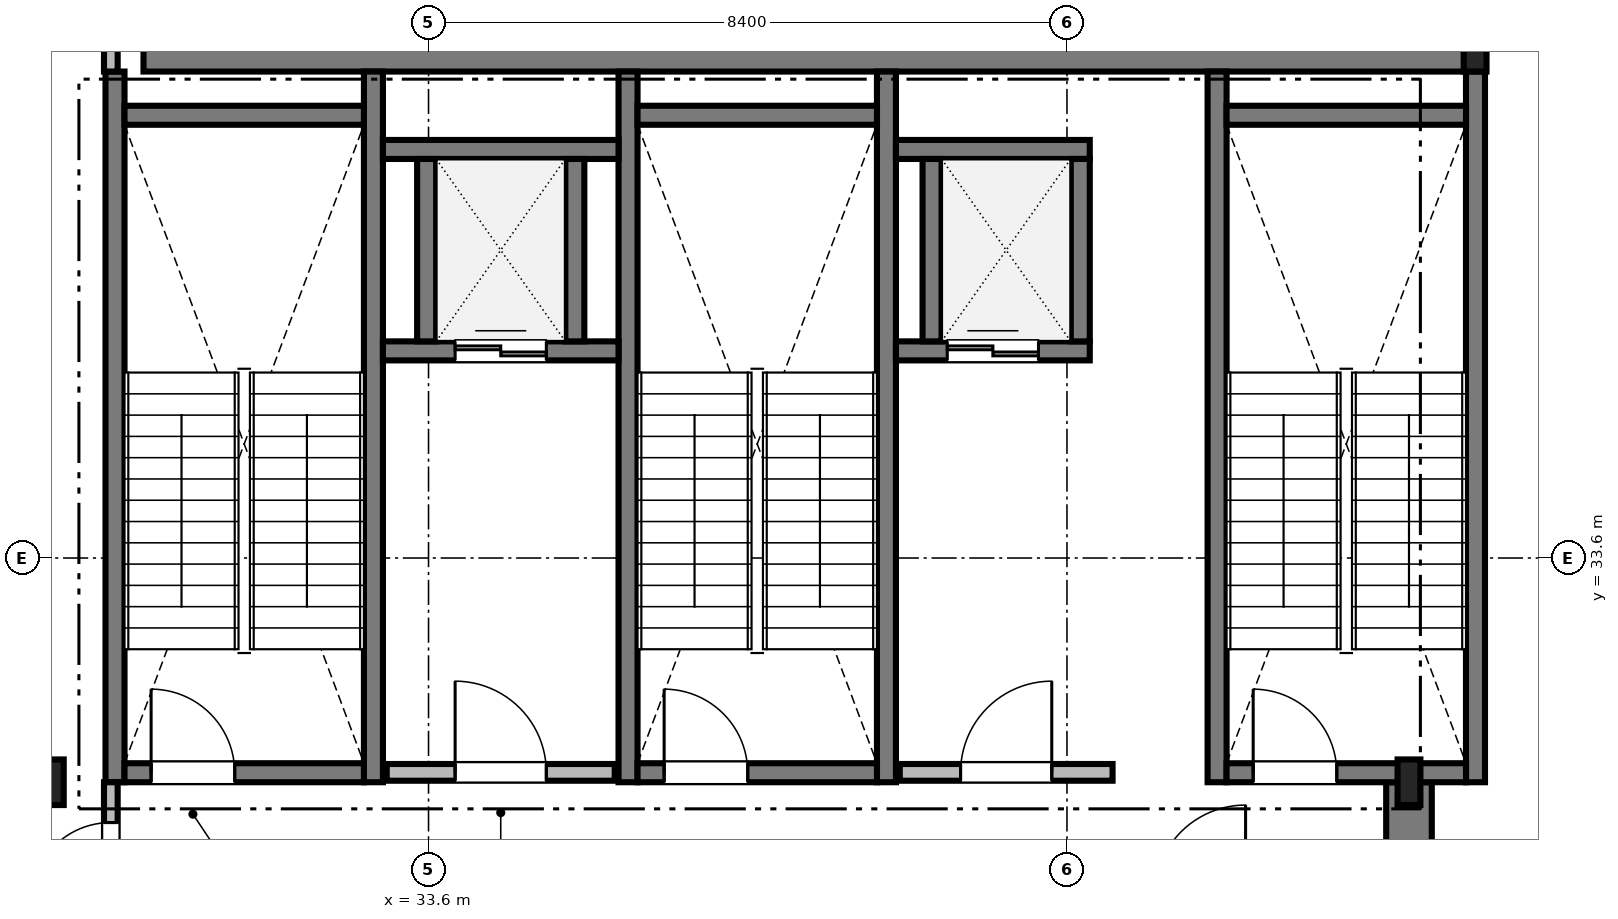
"""IFC4 building model, lengths in metres.
Left out: names, types, materials, properties, quantities, classifications, styles, units other than length and angle.
Written with IfcOpenShell. Run it as: python <this file> out.ifc"""

import sys

from ifc_helpers import new_model, si_unit, direction, frame, frame_2d, origin, origin_2d, place, context, subcontext, project, spatial, rectangle, i_section, extrude, source, transform, mapped, element, fill, save


model = new_model("IFC4")
c1 = context("Model", 3, precision=1e-05, world=origin(), true_north=direction((0.0, 1.0)))
c2 = subcontext(c1, "Body", "Model", "MODEL_VIEW")
j1 = project(units=[si_unit("LENGTHUNIT", "METRE"), si_unit("PLANEANGLEUNIT", "RADIAN")], contexts=[c1])
p1 = place(None, origin())
s1 = spatial("IfcSite", under=j1, at=p1, CompositionType="ELEMENT")
p2 = place(p1, origin())
s2 = spatial("IfcBuilding", under=s1, at=p2, CompositionType="ELEMENT")
p3 = place(p2, frame((0.0, 0.0, 291.15)))
s3 = spatial("IfcBuildingStorey", under=s2, at=p3, CompositionType="ELEMENT", Elevation=291.15)
m1 = source(origin(), c2, "Body", "SweptSolid", [
    extrude(rectangle(XDim=17.52, YDim=0.6, at=frame_2d((8.76, 0.0))), origin(), (0.0, 0.0, 1.0), 4.7),
])
p4 = place(p3, frame((29.85, 40.3, 0.0), z_axis=(0.0, 0.0, 1.0), x_axis=(1.0, 0.0, 0.0)))
e1 = element("IfcWall", 1, at=p4, inside=s3, PredefinedType="SHEAR", context=c2, shape_type="MappedRepresentation", body=[
    mapped(m1, transform((0.0, 0.0, 0.0), scale=1.0)),
])
m2 = source(origin(), c2, "Body", "SweptSolid", [
    extrude(rectangle(XDim=13.15, YDim=0.6, at=frame_2d((6.575, 0.0))), origin(), (0.0, 0.0, 1.0), 4.7),
])
p5 = place(p3, frame((46.5, 17.5, 0.0), z_axis=(0.0, 0.0, 1.0), x_axis=(0.0, 1.0, 0.0)))
e2 = element("IfcWall", 2, at=p5, inside=s3, PredefinedType="SHEAR", context=c2, shape_type="MappedRepresentation", body=[
    mapped(m2, transform((0.0, 0.0, 0.0), scale=1.0)),
])
m3 = source(origin(), c2, "Body", "SweptSolid", [
    extrude(i_section(OverallWidth=0.3, OverallDepth=0.6, WebThickness=0.015, FlangeThickness=0.03, FilletRadius=0.027, at=origin_2d()), origin(), (0.0, 0.0, 1.0), 4.7),
])
for number, where, z_axis, x_axis in (
    (3, (28.65, 30.65, 0.0), (0.0, 0.0, 1.0), (1.0, 0.0, 0.0)),
    (4, (46.5, 30.65, 0.0), (0.0, 0.0, 1.0), (1.0, 0.0, 0.0)),
    (5, (47.37, 40.3, 0.0), (0.0, 0.0, 1.0), (1.0, 0.0, 0.0)),
):
    element("IfcColumn", number, at=place(p3, frame(where, z_axis=z_axis, x_axis=x_axis)), inside=s3, PredefinedType="COLUMN", context=c2, shape_type="MappedRepresentation", body=[
        mapped(m3, transform((0.0, 0.0, 0.0), scale=1.0)),
    ])
m4 = source(origin(), c2, "Body", "SweptSolid", [
    extrude(rectangle(XDim=9.35, YDim=0.25, at=frame_2d((4.675, 0.0))), origin(), (0.0, 0.0, 1.0), 4.8),
])
for number, where, z_axis, x_axis in (
    (6, (29.475, 30.65, 0.0), (0.0, 0.0, 1.0), (0.0, 1.0, 0.0)),
    (7, (32.875, 30.65, 0.0), (0.0, 0.0, 1.0), (0.0, 1.0, 0.0)),
):
    element("IfcWall", number, at=place(p3, frame(where, z_axis=z_axis, x_axis=x_axis)), inside=s3, PredefinedType="SOLIDWALL", context=c2, shape_type="MappedRepresentation", body=[
        mapped(m4, transform((0.0, 0.0, 0.0), scale=1.0)),
    ])
m5 = source(origin(), c2, "Body", "SweptSolid", [
    extrude(rectangle(XDim=3.15, YDim=0.25, at=frame_2d((1.575, 0.0))), origin(), (0.0, 0.0, 1.0), 4.8),
])
p6 = place(p3, frame((29.6, 39.425, 0.0), z_axis=(0.0, 0.0, 1.0), x_axis=(1.0, 0.0, 0.0)))
e8 = element("IfcWall", 8, at=p6, inside=s3, PredefinedType="SOLIDWALL", context=c2, shape_type="MappedRepresentation", body=[
    mapped(m5, transform((0.0, 0.0, 0.0), scale=1.0)),
])
p7 = place(p3, frame((29.6, 30.775, 0.0), z_axis=(0.0, 0.0, 1.0), x_axis=(1.0, 0.0, 0.0)))
e9 = element("IfcWall", 9, at=p7, inside=s3, PredefinedType="SOLIDWALL", context=c2, shape_type="MappedRepresentation", body=[
    mapped(m5, transform((0.0, 0.0, 0.0), scale=1.0)),
])
m6 = source(origin(), c2, "Body", "SweptSolid", [
    extrude(rectangle(XDim=1.1, YDim=2.2, at=frame_2d((0.55, 1.1))), frame((0.0, 0.135, 0.0), z_axis=(0.0, -1.0, 0.0), x_axis=(1.0, 0.0, 0.0)), (0.0, 0.0, 1.0), 0.27),
])
p8 = place(p7, frame((0.35, 0.0, 0.0)))
e10 = element("IfcOpeningElement", 10, at=p8, cuts=e9, PredefinedType="OPENING", context=c2, shape_type="MappedRepresentation", body=[
    mapped(m6, transform((0.0, 0.0, 0.0), scale=1.0)),
])
for number, where, z_axis, x_axis in (
    (11, (36.225, 30.65, 0.0), (0.0, 0.0, 1.0), (0.0, 1.0, 0.0)),
    (12, (39.625, 30.65, 0.0), (0.0, 0.0, 1.0), (0.0, 1.0, 0.0)),
):
    element("IfcWall", number, at=place(p3, frame(where, z_axis=z_axis, x_axis=x_axis)), inside=s3, PredefinedType="SOLIDWALL", context=c2, shape_type="MappedRepresentation", body=[
        mapped(m4, transform((0.0, 0.0, 0.0), scale=1.0)),
    ])
p9 = place(p3, frame((36.35, 39.425, 0.0), z_axis=(0.0, 0.0, 1.0), x_axis=(1.0, 0.0, 0.0)))
e13 = element("IfcWall", 13, at=p9, inside=s3, PredefinedType="SOLIDWALL", context=c2, shape_type="MappedRepresentation", body=[
    mapped(m5, transform((0.0, 0.0, 0.0), scale=1.0)),
])
p10 = place(p3, frame((36.35, 30.775, 0.0), z_axis=(0.0, 0.0, 1.0), x_axis=(1.0, 0.0, 0.0)))
e14 = element("IfcWall", 14, at=p10, inside=s3, PredefinedType="SOLIDWALL", context=c2, shape_type="MappedRepresentation", body=[
    mapped(m5, transform((0.0, 0.0, 0.0), scale=1.0)),
])
p11 = place(p10, frame((0.35, 0.0, 0.0)))
e15 = element("IfcOpeningElement", 15, at=p11, cuts=e14, PredefinedType="OPENING", context=c2, shape_type="MappedRepresentation", body=[
    mapped(m6, transform((0.0, 0.0, 0.0), scale=1.0)),
])
for number, where, z_axis, x_axis in (
    (16, (43.975, 30.65, 0.0), (0.0, 0.0, 1.0), (0.0, 1.0, 0.0)),
    (17, (47.375, 30.65, 0.0), (0.0, 0.0, 1.0), (0.0, 1.0, 0.0)),
):
    element("IfcWall", number, at=place(p3, frame(where, z_axis=z_axis, x_axis=x_axis)), inside=s3, PredefinedType="SOLIDWALL", context=c2, shape_type="MappedRepresentation", body=[
        mapped(m4, transform((0.0, 0.0, 0.0), scale=1.0)),
    ])
p12 = place(p3, frame((44.1, 39.425, 0.0), z_axis=(0.0, 0.0, 1.0), x_axis=(1.0, 0.0, 0.0)))
e18 = element("IfcWall", 18, at=p12, inside=s3, PredefinedType="SOLIDWALL", context=c2, shape_type="MappedRepresentation", body=[
    mapped(m5, transform((0.0, 0.0, 0.0), scale=1.0)),
])
p13 = place(p3, frame((44.1, 30.775, 0.0), z_axis=(0.0, 0.0, 1.0), x_axis=(1.0, 0.0, 0.0)))
e19 = element("IfcWall", 19, at=p13, inside=s3, PredefinedType="SOLIDWALL", context=c2, shape_type="MappedRepresentation", body=[
    mapped(m5, transform((0.0, 0.0, 0.0), scale=1.0)),
])
p14 = place(p13, frame((0.35, 0.0, 0.0)))
e20 = element("IfcOpeningElement", 20, at=p14, cuts=e19, PredefinedType="OPENING", context=c2, shape_type="MappedRepresentation", body=[
    mapped(m6, transform((0.0, 0.0, 0.0), scale=1.0)),
])
m7 = source(origin(), c2, "Body", "SweptSolid", [
    extrude(rectangle(XDim=3.0, YDim=0.22, at=frame_2d((1.5, 0.0))), origin(), (0.0, 0.0, 1.0), 4.7),
])
p15 = place(p3, frame((33.05, 30.78, 0.0), z_axis=(0.0, 0.0, 1.0), x_axis=(1.0, 0.0, 0.0)))
e21 = element("IfcWall", 21, at=p15, inside=s3, PredefinedType="SOLIDWALL", context=c2, shape_type="MappedRepresentation", body=[
    mapped(m7, transform((0.0, 0.0, 0.0), scale=1.0)),
])
m8 = source(origin(), c2, "Body", "SweptSolid", [
    extrude(rectangle(XDim=1.2, YDim=2.2, at=frame_2d((0.6, 1.1))), frame((0.0, 0.12, 0.0), z_axis=(0.0, -1.0, 0.0), x_axis=(1.0, 0.0, 0.0)), (0.0, 0.0, 1.0), 0.24),
])
p16 = place(p15, frame((0.9, 0.0, 0.0)))
e22 = element("IfcOpeningElement", 22, at=p16, cuts=e21, PredefinedType="OPENING", context=c2, shape_type="MappedRepresentation", body=[
    mapped(m8, transform((0.0, 0.0, 0.0), scale=1.0)),
])
m9 = source(origin(), c2, "Body", "SweptSolid", [
    extrude(rectangle(XDim=2.8, YDim=0.22, at=frame_2d((1.4, 0.0))), origin(), (0.0, 0.0, 1.0), 4.7),
])
p17 = place(p3, frame((39.8, 30.78, 0.0), z_axis=(0.0, 0.0, 1.0), x_axis=(1.0, 0.0, 0.0)))
e23 = element("IfcWall", 23, at=p17, inside=s3, PredefinedType="SOLIDWALL", context=c2, shape_type="MappedRepresentation", body=[
    mapped(m9, transform((0.0, 0.0, 0.0), scale=1.0)),
])
p18 = place(p17, frame((0.8, 0.0, 0.0)))
e24 = element("IfcOpeningElement", 24, at=p18, cuts=e23, PredefinedType="OPENING", context=c2, shape_type="MappedRepresentation", body=[
    mapped(m8, transform((0.0, 0.0, 0.0), scale=1.0)),
])
m10 = source(origin(), c2, "Body", "SweptSolid", [
    extrude(rectangle(XDim=3.1, YDim=0.25, at=frame_2d((1.55, 0.0))), origin(), (0.0, 0.0, 1.0), 4.7),
])
p19 = place(p3, frame((33.0, 36.325, 0.0), z_axis=(0.0, 0.0, 1.0), x_axis=(1.0, 0.0, 0.0)))
e25 = element("IfcWall", 25, at=p19, inside=s3, PredefinedType="SOLIDWALL", context=c2, shape_type="MappedRepresentation", body=[
    mapped(m10, transform((0.0, 0.0, 0.0), scale=1.0)),
])
m11 = source(origin(), c2, "Body", "SweptSolid", [
    extrude(rectangle(XDim=1.2, YDim=2.25, at=frame_2d((0.6, 1.125))), frame((0.0, 0.135, 0.0), z_axis=(0.0, -1.0, 0.0), x_axis=(1.0, 0.0, 0.0)), (0.0, 0.0, 1.0), 0.27),
])
p20 = place(p19, frame((0.95, 0.0, 0.0)))
e26 = element("IfcOpeningElement", 26, at=p20, cuts=e25, PredefinedType="OPENING", context=c2, shape_type="MappedRepresentation", body=[
    mapped(m11, transform((0.0, 0.0, 0.0), scale=1.0)),
])
p21 = place(p3, frame((33.0, 38.975, 0.0), z_axis=(0.0, 0.0, 1.0), x_axis=(1.0, 0.0, 0.0)))
e27 = element("IfcWall", 27, at=p21, inside=s3, PredefinedType="SOLIDWALL", context=c2, shape_type="MappedRepresentation", body=[
    mapped(m10, transform((0.0, 0.0, 0.0), scale=1.0)),
])
m12 = source(origin(), c2, "Body", "SweptSolid", [
    extrude(rectangle(XDim=2.4, YDim=0.25, at=frame_2d((1.2, 0.0))), origin(), (0.0, 0.0, 1.0), 4.7),
])
for number, where, z_axis, x_axis in (
    (28, (33.575, 36.45, 0.0), (0.0, 0.0, 1.0), (0.0, 1.0, 0.0)),
    (29, (35.525, 36.45, 0.0), (0.0, 0.0, 1.0), (0.0, 1.0, 0.0)),
):
    element("IfcWall", number, at=place(p3, frame(where, z_axis=z_axis, x_axis=x_axis)), inside=s3, PredefinedType="SOLIDWALL", context=c2, shape_type="MappedRepresentation", body=[
        mapped(m12, transform((0.0, 0.0, 0.0), scale=1.0)),
    ])
m13 = source(origin(), c2, "Body", "SweptSolid", [
    extrude(rectangle(XDim=2.55, YDim=0.25, at=frame_2d((1.275, 0.0))), origin(), (0.0, 0.0, 1.0), 4.7),
])
p22 = place(p3, frame((39.75, 36.325, 0.0), z_axis=(0.0, 0.0, 1.0), x_axis=(1.0, 0.0, 0.0)))
e30 = element("IfcWall", 30, at=p22, inside=s3, PredefinedType="SOLIDWALL", context=c2, shape_type="MappedRepresentation", body=[
    mapped(m13, transform((0.0, 0.0, 0.0), scale=1.0)),
])
p23 = place(p22, frame((0.675, 0.0, 0.0)))
e31 = element("IfcOpeningElement", 31, at=p23, cuts=e30, PredefinedType="OPENING", context=c2, shape_type="MappedRepresentation", body=[
    mapped(m11, transform((0.0, 0.0, 0.0), scale=1.0)),
])
p24 = place(p3, frame((39.75, 38.975, 0.0), z_axis=(0.0, 0.0, 1.0), x_axis=(1.0, 0.0, 0.0)))
e32 = element("IfcWall", 32, at=p24, inside=s3, PredefinedType="SOLIDWALL", context=c2, shape_type="MappedRepresentation", body=[
    mapped(m13, transform((0.0, 0.0, 0.0), scale=1.0)),
])
for number, where, z_axis, x_axis in (
    (33, (40.225, 36.45, 0.0), (0.0, 0.0, 1.0), (0.0, 1.0, 0.0)),
    (34, (42.175, 36.45, 0.0), (0.0, 0.0, 1.0), (0.0, 1.0, 0.0)),
):
    element("IfcWall", number, at=place(p3, frame(where, z_axis=z_axis, x_axis=x_axis)), inside=s3, PredefinedType="SOLIDWALL", context=c2, shape_type="MappedRepresentation", body=[
        mapped(m12, transform((0.0, 0.0, 0.0), scale=1.0)),
    ])
m14 = source(origin(), c2, "Body", "SweptSolid", [
    extrude(rectangle(XDim=2.13, YDim=0.18, at=frame_2d((1.065, 0.0))), origin(), (0.0, 0.0, 1.0), 4.332),
])
p25 = place(p3, frame((29.42, 28.52, 0.0), z_axis=(0.0, 0.0, 1.0), x_axis=(0.0, 1.0, 0.0)))
e35 = element("IfcWall", 35, at=p25, inside=s3, PredefinedType="PARTITIONING", context=c2, shape_type="MappedRepresentation", body=[
    mapped(m14, transform((0.0, 0.0, 0.0), scale=1.0)),
])
m15 = source(origin(), c2, "Body", "SweptSolid", [
    extrude(rectangle(XDim=1.05, YDim=2.2, at=frame_2d((0.525, 1.1))), frame((0.0, 0.1, 0.0), z_axis=(0.0, -1.0, 0.0), x_axis=(1.0, 0.0, 0.0)), (0.0, 0.0, 1.0), 0.2),
])
p26 = place(p25, frame((0.55, 0.0, 0.0)))
e36 = element("IfcOpeningElement", 36, at=p26, cuts=e35, PredefinedType="OPENING", context=c2, shape_type="MappedRepresentation", body=[
    mapped(m15, transform((0.0, 0.0, 0.0), scale=1.0)),
])
m16 = source(origin(), c2, "Body", "SweptSolid", [
    extrude(rectangle(XDim=3.418, YDim=0.18, at=frame_2d((1.709, 0.0))), origin(), (0.0, 0.0, 1.0), 3.942),
])
p27 = place(p3, frame((29.42, 40.0, 0.0), z_axis=(0.0, 0.0, 1.0), x_axis=(0.0, 1.0, 0.0)))
e37 = element("IfcWall", 37, at=p27, inside=s3, PredefinedType="PARTITIONING", context=c2, shape_type="MappedRepresentation", body=[
    mapped(m16, transform((0.0, 0.0, 0.0), scale=1.0)),
])
m17 = source(origin(), c2, "Body", "SweptSolid", [
    extrude(rectangle(XDim=1.1, YDim=2.2, at=frame_2d((0.55, 1.1))), frame((0.0, 0.025, 0.0), z_axis=(0.0, -1.0, 0.0), x_axis=(1.0, 0.0, 0.0)), (0.0, 0.0, 1.0), 0.05),
])
p28 = place(p8, origin())
e38 = element("IfcDoor", 38, at=p28, inside=s3, OperationType="SINGLE_SWING_LEFT", PredefinedType="DOOR", context=c2, shape_type="MappedRepresentation", body=[
    mapped(m17, transform((0.0, 0.0, 0.0), scale=1.0)),
])
fill(e10, e38)
p29 = place(p11, origin())
e39 = element("IfcDoor", 39, at=p29, inside=s3, OperationType="SINGLE_SWING_LEFT", PredefinedType="DOOR", context=c2, shape_type="MappedRepresentation", body=[
    mapped(m17, transform((0.0, 0.0, 0.0), scale=1.0)),
])
fill(e15, e39)
p30 = place(p14, origin())
e40 = element("IfcDoor", 40, at=p30, inside=s3, OperationType="SINGLE_SWING_LEFT", PredefinedType="DOOR", context=c2, shape_type="MappedRepresentation", body=[
    mapped(m17, transform((0.0, 0.0, 0.0), scale=1.0)),
])
fill(e20, e40)
m18 = source(origin(), c2, "Body", "SweptSolid", [
    extrude(rectangle(XDim=1.2, YDim=2.2, at=frame_2d((0.6, 1.1))), frame((0.0, 0.025, 0.0), z_axis=(0.0, -1.0, 0.0), x_axis=(1.0, 0.0, 0.0)), (0.0, 0.0, 1.0), 0.05),
])
p31 = place(p16, origin())
e41 = element("IfcDoor", 41, at=p31, inside=s3, OperationType="SINGLE_SWING_LEFT", PredefinedType="DOOR", context=c2, shape_type="MappedRepresentation", body=[
    mapped(m18, transform((0.0, 0.0, 0.0), scale=1.0)),
])
fill(e22, e41)
p32 = place(p18, origin())
e42 = element("IfcDoor", 42, at=p32, inside=s3, OperationType="SINGLE_SWING_RIGHT", PredefinedType="DOOR", context=c2, shape_type="MappedRepresentation", body=[
    mapped(m18, transform((0.0, 0.0, 0.0), scale=1.0)),
])
fill(e24, e42)
m19 = source(origin(), c2, "Body", "SweptSolid", [
    extrude(rectangle(XDim=1.2, YDim=2.25, at=frame_2d((0.6, 1.125))), frame((0.0, 0.025, 0.0), z_axis=(0.0, -1.0, 0.0), x_axis=(1.0, 0.0, 0.0)), (0.0, 0.0, 1.0), 0.05),
])
p33 = place(p20, origin())
e43 = element("IfcDoor", 43, at=p33, inside=s3, OperationType="DOUBLE_DOOR_SLIDING", PredefinedType="DOOR", context=c2, shape_type="MappedRepresentation", body=[
    mapped(m19, transform((0.0, 0.0, 0.0), scale=1.0)),
])
fill(e26, e43)
p34 = place(p23, origin())
e44 = element("IfcDoor", 44, at=p34, inside=s3, OperationType="DOUBLE_DOOR_SLIDING", PredefinedType="DOOR", context=c2, shape_type="MappedRepresentation", body=[
    mapped(m19, transform((0.0, 0.0, 0.0), scale=1.0)),
])
fill(e31, e44)
m20 = source(origin(), c2, "Body", "SweptSolid", [
    extrude(rectangle(XDim=1.05, YDim=2.2, at=frame_2d((0.525, 1.1))), frame((0.0, 0.025, 0.0), z_axis=(0.0, -1.0, 0.0), x_axis=(1.0, 0.0, 0.0)), (0.0, 0.0, 1.0), 0.05),
])
p35 = place(p26, origin())
e45 = element("IfcDoor", 45, at=p35, inside=s3, OperationType="SINGLE_SWING_LEFT", PredefinedType="DOOR", context=c2, shape_type="MappedRepresentation", body=[
    mapped(m20, transform((0.0, 0.0, 0.0), scale=1.0)),
])
fill(e36, e45)
save(model, sys.argv[1])
